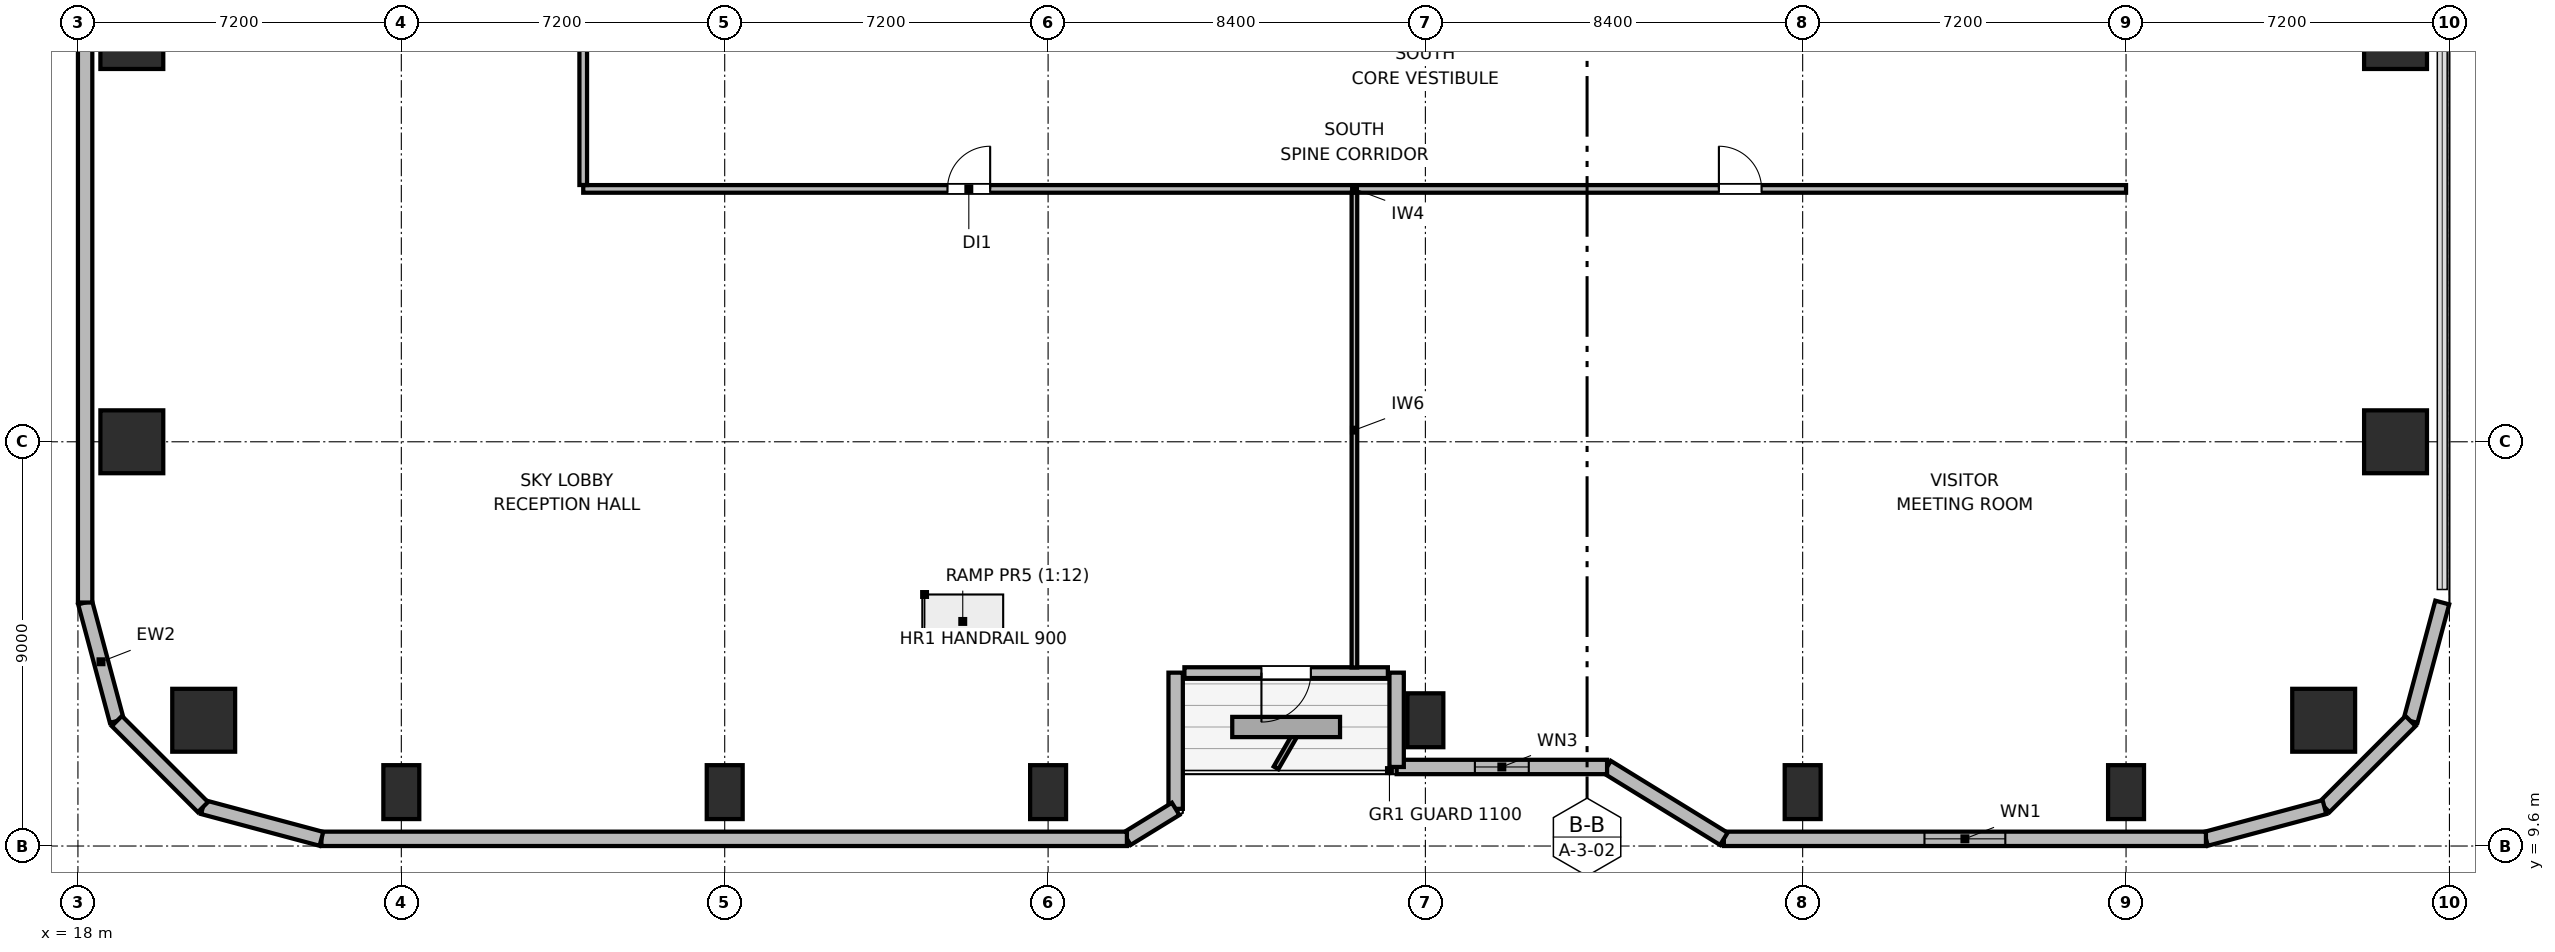
"""IFC4 building model, lengths in metres.
Left out: names, types, materials, properties, quantities, classifications, styles, units other than length and angle.
Written with IfcOpenShell. Run it as: python <this file> out.ifc"""

import sys

from ifc_helpers import new_model, si_unit, direction, frame, frame_2d, origin, origin_2d, place, context, subcontext, project, spatial, rectangle, circle, extrude, element, fill, save


model = new_model("IFC4")
c1 = context("Model", 3, precision=1e-05, world=origin(), true_north=direction((0.0, 1.0)))
c2 = subcontext(c1, "Body", "Model", "MODEL_VIEW")
j1 = project(units=[si_unit("LENGTHUNIT", "METRE"), si_unit("PLANEANGLEUNIT", "RADIAN")], contexts=[c1])
p1 = place(None, origin())
s1 = spatial("IfcSite", under=j1, at=p1, CompositionType="ELEMENT")
p2 = place(p1, origin())
s2 = spatial("IfcBuilding", under=s1, at=p2, CompositionType="ELEMENT")
p3 = place(p2, frame((0.0, 0.0, 120.9)))
s3 = spatial("IfcBuildingStorey", under=s2, at=p3, CompositionType="ELEMENT", Elevation=120.9)
for number, where, z_axis, x_axis in (
    (1, (20.8, 12.4, 0.0), (0.0, 0.0, 1.0), (1.0, 0.0, 0.0)),
    (2, (68.0, 12.4, 0.0), (0.0, 0.0, 1.0), (1.0, 0.0, 0.0)),
):
    element("IfcColumn", number, at=place(p3, frame(where, z_axis=z_axis, x_axis=x_axis)), inside=s3, PredefinedType="COLUMN", context=c2, shape_type="SweptSolid", body=[
        extrude(circle(Radius=0.7, at=origin_2d()), origin(), (0.0, 0.0, 1.0), 4.5),
    ])
for number, where, z_axis, x_axis in (
    (3, (25.2, 10.8, 0.0), (0.0, 0.0, 1.0), (1.0, 0.0, 0.0)),
    (4, (32.4, 10.8, 0.0), (0.0, 0.0, 1.0), (1.0, 0.0, 0.0)),
    (5, (39.6, 10.8, 0.0), (0.0, 0.0, 1.0), (1.0, 0.0, 0.0)),
    (6, (48.0, 12.4, 0.0), (0.0, 0.0, 1.0), (1.0, 0.0, 0.0)),
    (7, (56.4, 10.8, 0.0), (0.0, 0.0, 1.0), (1.0, 0.0, 0.0)),
    (8, (63.6, 10.8, 0.0), (0.0, 0.0, 1.0), (1.0, 0.0, 0.0)),
):
    element("IfcColumn", number, at=place(p3, frame(where, z_axis=z_axis, x_axis=x_axis)), inside=s3, PredefinedType="COLUMN", context=c2, shape_type="SweptSolid", body=[
        extrude(rectangle(XDim=0.8, YDim=1.2, at=origin_2d()), origin(), (0.0, 0.0, 1.0), 4.5),
    ])
for number, where, z_axis, x_axis in (
    (9, (19.2, 18.6, 0.0), (0.0, 0.0, 1.0), (1.0, 0.0, 0.0)),
    (10, (69.6, 18.6, 0.0), (0.0, 0.0, 1.0), (1.0, 0.0, 0.0)),
    (11, (19.2, 27.6, 0.0), (0.0, 0.0, 1.0), (1.0, 0.0, 0.0)),
    (12, (69.6, 27.6, 0.0), (0.0, 0.0, 1.0), (1.0, 0.0, 0.0)),
):
    element("IfcColumn", number, at=place(p3, frame(where, z_axis=z_axis, x_axis=x_axis)), inside=s3, PredefinedType="COLUMN", context=c2, shape_type="SweptSolid", body=[
        extrude(rectangle(XDim=1.4, YDim=1.4, at=origin_2d()), origin(), (0.0, 0.0, 1.0), 4.5),
    ])
p4 = place(p3, frame((18.866, 12.383, 0.0), z_axis=(0.0, 0.0, 1.0), x_axis=(-0.25869736047, 0.965958423373, 0.0)))
e13 = element("IfcWall", 13, at=p4, inside=s3, PredefinedType="SOLIDWALL", context=c2, shape_type="SweptSolid", body=[
    extrude(rectangle(XDim=2.731, YDim=0.32, at=frame_2d((1.366, 0.0))), origin(), (0.0, 0.0, 1.0), 4.24),
])
p5 = place(p3, frame((18.16, 15.021, 0.0), z_axis=(0.0, 0.0, 1.0), x_axis=(0.0, 1.0, 0.0)))
e14 = element("IfcWall", 14, at=p5, inside=s3, PredefinedType="SOLIDWALL", context=c2, shape_type="SweptSolid", body=[
    extrude(rectangle(XDim=14.219, YDim=0.32, at=frame_2d((7.109, 0.0))), origin(), (0.0, 0.0, 1.0), 4.24),
])
p6 = place(p3, frame((70.64, 15.021, 0.0), z_axis=(0.0, 0.0, 1.0), x_axis=(-0.258613949072, -0.965980758269, 0.0)))
e15 = element("IfcWall", 15, at=p6, inside=s3, PredefinedType="SOLIDWALL", context=c2, shape_type="SweptSolid", body=[
    extrude(rectangle(XDim=2.731, YDim=0.32, at=frame_2d((1.366, 0.0))), origin(), (0.0, 0.0, 1.0), 4.24),
])
p7 = place(p3, frame((69.934, 12.383, 0.0), z_axis=(0.0, 0.0, 1.0), x_axis=(-0.707151821269, -0.707061738235, 0.0)))
e16 = element("IfcWall", 16, at=p7, inside=s3, PredefinedType="SOLIDWALL", context=c2, shape_type="SweptSolid", body=[
    extrude(rectangle(XDim=2.71, YDim=0.32, at=frame_2d((1.355, 0.0))), origin(), (0.0, 0.0, 1.0), 4.24),
])
p8 = place(p3, frame((68.017, 10.467, 0.0), z_axis=(0.0, 0.0, 1.0), x_axis=(-0.965958423373, -0.25869736047, 0.0)))
e17 = element("IfcWall", 17, at=p8, inside=s3, PredefinedType="SOLIDWALL", context=c2, shape_type="SweptSolid", body=[
    extrude(rectangle(XDim=2.731, YDim=0.32, at=frame_2d((1.366, 0.0))), origin(), (0.0, 0.0, 1.0), 4.24),
])
p9 = place(p3, frame((65.379, 9.76, 0.0), z_axis=(0.0, 0.0, 1.0), x_axis=(-1.0, 0.0, 0.0)))
e18 = element("IfcWall", 18, at=p9, inside=s3, PredefinedType="SOLIDWALL", context=c2, shape_type="SweptSolid", body=[
    extrude(rectangle(XDim=10.734, YDim=0.32, at=frame_2d((5.367, 0.0))), origin(), (0.0, 0.0, 1.0), 4.24),
])
p10 = place(p9, frame((4.467, 0.0, 0.85)))
e19 = element("IfcOpeningElement", 19, at=p10, cuts=e18, PredefinedType="OPENING", context=c2, shape_type="SweptSolid", body=[
    extrude(rectangle(XDim=1.8, YDim=1.1, at=frame_2d((0.9, 0.55))), frame((0.0, 0.17, 0.0), z_axis=(0.0, -1.0, 0.0), x_axis=(1.0, 0.0, 0.0)), (0.0, 0.0, 1.0), 0.34),
])
p11 = place(p3, frame((54.645, 9.76, 0.0), z_axis=(0.0, 0.0, 1.0), x_axis=(-0.851630857047, 0.524142044989, 0.0)))
e20 = element("IfcWall", 20, at=p11, inside=s3, PredefinedType="SOLIDWALL", context=c2, shape_type="SweptSolid", body=[
    extrude(rectangle(XDim=3.053, YDim=0.32, at=frame_2d((1.526, 0.0))), origin(), (0.0, 0.0, 1.0), 3.475),
])
p12 = place(p3, frame((52.045, 11.36, 0.0), z_axis=(0.0, 0.0, 1.0), x_axis=(-1.0, 0.0, 0.0)))
e21 = element("IfcWall", 21, at=p12, inside=s3, PredefinedType="SOLIDWALL", context=c2, shape_type="SweptSolid", body=[
    extrude(rectangle(XDim=4.685, YDim=0.32, at=frame_2d((2.343, 0.0))), origin(), (0.0, 0.0, 1.0), 3.475),
])
p13 = place(p12, frame((1.743, 0.0, 0.85)))
e22 = element("IfcOpeningElement", 22, at=p13, cuts=e21, PredefinedType="OPENING", context=c2, shape_type="SweptSolid", body=[
    extrude(rectangle(XDim=1.2, YDim=1.1, at=frame_2d((0.6, 0.55))), frame((0.0, 0.17, 0.0), z_axis=(0.0, -1.0, 0.0), x_axis=(1.0, 0.0, 0.0)), (0.0, 0.0, 1.0), 0.34),
])
p14 = place(p3, frame((47.36, 11.36, 0.0), z_axis=(0.0, 0.0, 1.0), x_axis=(0.0, 1.0, 0.0)))
e23 = element("IfcWall", 23, at=p14, inside=s3, PredefinedType="SOLIDWALL", context=c2, shape_type="SweptSolid", body=[
    extrude(rectangle(XDim=2.1, YDim=0.32, at=frame_2d((1.05, 0.0))), origin(), (0.0, 0.0, 1.0), 3.475),
])
p15 = place(p3, frame((47.165, 13.46, 0.0), z_axis=(0.0, 0.0, 1.0), x_axis=(-1.0, 0.0, 0.0)))
e24 = element("IfcWall", 24, at=p15, inside=s3, PredefinedType="SOLIDWALL", context=c2, shape_type="SweptSolid", body=[
    extrude(rectangle(XDim=4.53, YDim=0.24, at=frame_2d((2.265, 0.0))), origin(), (0.0, 0.0, 1.0), 4.24),
])
p16 = place(p15, frame((1.715, 0.0, 0.0)))
e25 = element("IfcOpeningElement", 25, at=p16, cuts=e24, PredefinedType="OPENING", context=c2, shape_type="SweptSolid", body=[
    extrude(rectangle(XDim=1.1, YDim=2.04, at=frame_2d((0.55, 1.02))), frame((0.0, 0.13, 0.0), z_axis=(0.0, -1.0, 0.0), x_axis=(1.0, 0.0, 0.0)), (0.0, 0.0, 1.0), 0.26),
])
p17 = place(p3, frame((42.44, 13.46, 0.0), z_axis=(0.0, 0.0, 1.0), x_axis=(0.0, -1.0, 0.0)))
e26 = element("IfcWall", 26, at=p17, inside=s3, PredefinedType="SOLIDWALL", context=c2, shape_type="SweptSolid", body=[
    extrude(rectangle(XDim=3.032, YDim=0.32, at=frame_2d((1.516, 0.0))), origin(), (0.0, 0.0, 1.0), 3.475),
])
p18 = place(p3, frame((42.44, 10.427, 0.0), z_axis=(0.0, 0.0, 1.0), x_axis=(-0.851776724646, -0.523904964045, 0.0)))
e27 = element("IfcWall", 27, at=p18, inside=s3, PredefinedType="SOLIDWALL", context=c2, shape_type="SweptSolid", body=[
    extrude(rectangle(XDim=1.274, YDim=0.32, at=frame_2d((0.637, 0.0))), origin(), (0.0, 0.0, 1.0), 4.24),
])
p19 = place(p3, frame((41.355, 9.76, 0.0), z_axis=(0.0, 0.0, 1.0), x_axis=(-1.0, 0.0, 0.0)))
e28 = element("IfcWall", 28, at=p19, inside=s3, PredefinedType="SOLIDWALL", context=c2, shape_type="SweptSolid", body=[
    extrude(rectangle(XDim=17.934, YDim=0.32, at=frame_2d((8.967, 0.0))), origin(), (0.0, 0.0, 1.0), 4.24),
])
p20 = place(p3, frame((23.421, 9.76, 0.0), z_axis=(0.0, 0.0, 1.0), x_axis=(-0.965964405026, 0.25867502435, 0.0)))
e29 = element("IfcWall", 29, at=p20, inside=s3, PredefinedType="SOLIDWALL", context=c2, shape_type="SweptSolid", body=[
    extrude(rectangle(XDim=2.731, YDim=0.32, at=frame_2d((1.366, 0.0))), origin(), (0.0, 0.0, 1.0), 4.24),
])
p21 = place(p3, frame((20.783, 10.467, 0.0), z_axis=(0.0, 0.0, 1.0), x_axis=(-0.707106781187, 0.707106781187, 0.0)))
e30 = element("IfcWall", 30, at=p21, inside=s3, PredefinedType="SOLIDWALL", context=c2, shape_type="SweptSolid", body=[
    extrude(rectangle(XDim=2.71, YDim=0.32, at=frame_2d((1.355, 0.0))), origin(), (0.0, 0.0, 1.0), 4.24),
])
p22 = place(p3, frame((29.25, 24.23, 0.0), z_axis=(0.0, 0.0, 1.0), x_axis=(1.0, 0.0, 0.0)))
e31 = element("IfcWall", 31, at=p22, inside=s3, PredefinedType="PARTITIONING", context=c2, shape_type="SweptSolid", body=[
    extrude(rectangle(XDim=34.35, YDim=0.17, at=frame_2d((17.175, 0.0))), origin(), (0.0, 0.0, 1.0), 4.24),
])
p23 = place(p22, frame((8.11, 0.0, 0.0)))
e32 = element("IfcOpeningElement", 32, at=p23, cuts=e31, PredefinedType="OPENING", context=c2, shape_type="SweptSolid", body=[
    extrude(rectangle(XDim=0.95, YDim=2.04, at=frame_2d((0.475, 1.02))), frame((0.0, 0.095, 0.0), z_axis=(0.0, -1.0, 0.0), x_axis=(1.0, 0.0, 0.0)), (0.0, 0.0, 1.0), 0.19),
])
p24 = place(p22, frame((25.285, 0.0, 0.0)))
e33 = element("IfcOpeningElement", 33, at=p24, cuts=e31, PredefinedType="OPENING", context=c2, shape_type="SweptSolid", body=[
    extrude(rectangle(XDim=0.95, YDim=2.04, at=frame_2d((0.475, 1.02))), frame((0.0, 0.095, 0.0), z_axis=(0.0, -1.0, 0.0), x_axis=(1.0, 0.0, 0.0)), (0.0, 0.0, 1.0), 0.19),
])
p25 = place(p3, frame((29.25, 24.317, 0.0), z_axis=(0.0, 0.0, 1.0), x_axis=(0.0, 1.0, 0.0)))
e34 = element("IfcWall", 34, at=p25, inside=s3, PredefinedType="PARTITIONING", context=c2, shape_type="SweptSolid", body=[
    extrude(rectangle(XDim=10.083, YDim=0.17, at=frame_2d((5.042, 0.0))), origin(), (0.0, 0.0, 1.0), 4.24),
])
p26 = place(p25, frame((4.523, 0.0, 0.0)))
e35 = element("IfcOpeningElement", 35, at=p26, cuts=e34, PredefinedType="OPENING", context=c2, shape_type="SweptSolid", body=[
    extrude(rectangle(XDim=0.95, YDim=2.04, at=frame_2d((0.475, 1.02))), frame((0.0, 0.095, 0.0), z_axis=(0.0, -1.0, 0.0), x_axis=(1.0, 0.0, 0.0)), (0.0, 0.0, 1.0), 0.19),
])
p27 = place(p3, frame((46.42, 13.575, 0.0), z_axis=(0.0, 0.0, 1.0), x_axis=(0.0, 1.0, 0.0)))
e36 = element("IfcWall", 36, at=p27, inside=s3, PredefinedType="PARTITIONING", context=c2, shape_type="SweptSolid", body=[
    extrude(rectangle(XDim=10.568, YDim=0.125, at=frame_2d((5.284, 0.0))), origin(), (0.0, 0.0, 1.0), 4.24),
])
p28 = place(p10, origin())
e37 = element("IfcWindow", 37, at=p28, inside=s3, PartitioningType="SINGLE_PANEL", PredefinedType="WINDOW", context=c2, shape_type="SweptSolid", body=[
    extrude(rectangle(XDim=1.8, YDim=1.1, at=frame_2d((0.9, 0.55))), frame((0.0, 0.03, 0.0), z_axis=(0.0, -1.0, 0.0), x_axis=(1.0, 0.0, 0.0)), (0.0, 0.0, 1.0), 0.06),
])
fill(e19, e37)
p29 = place(p13, origin())
e38 = element("IfcWindow", 38, at=p29, inside=s3, PartitioningType="SINGLE_PANEL", PredefinedType="WINDOW", context=c2, shape_type="SweptSolid", body=[
    extrude(rectangle(XDim=1.2, YDim=1.1, at=frame_2d((0.6, 0.55))), frame((0.0, 0.03, 0.0), z_axis=(0.0, -1.0, 0.0), x_axis=(1.0, 0.0, 0.0)), (0.0, 0.0, 1.0), 0.06),
])
fill(e22, e38)
p30 = place(p16, origin())
e39 = element("IfcDoor", 39, at=p30, inside=s3, OperationType="SINGLE_SWING_RIGHT", PredefinedType="DOOR", context=c2, shape_type="SweptSolid", body=[
    extrude(rectangle(XDim=1.1, YDim=2.04, at=frame_2d((0.55, 1.02))), frame((0.0, 0.025, 0.0), z_axis=(0.0, -1.0, 0.0), x_axis=(1.0, 0.0, 0.0)), (0.0, 0.0, 1.0), 0.05),
])
fill(e25, e39)
p31 = place(p23, origin())
e40 = element("IfcDoor", 40, at=p31, inside=s3, OperationType="SINGLE_SWING_RIGHT", PredefinedType="DOOR", context=c2, shape_type="SweptSolid", body=[
    extrude(rectangle(XDim=0.95, YDim=2.04, at=frame_2d((0.475, 1.02))), frame((0.0, 0.025, 0.0), z_axis=(0.0, -1.0, 0.0), x_axis=(1.0, 0.0, 0.0)), (0.0, 0.0, 1.0), 0.05),
])
fill(e32, e40)
p32 = place(p24, origin())
e41 = element("IfcDoor", 41, at=p32, inside=s3, OperationType="SINGLE_SWING_LEFT", PredefinedType="DOOR", context=c2, shape_type="SweptSolid", body=[
    extrude(rectangle(XDim=0.95, YDim=2.04, at=frame_2d((0.475, 1.02))), frame((0.0, 0.025, 0.0), z_axis=(0.0, -1.0, 0.0), x_axis=(1.0, 0.0, 0.0)), (0.0, 0.0, 1.0), 0.05),
])
fill(e33, e41)
save(model, sys.argv[1])
